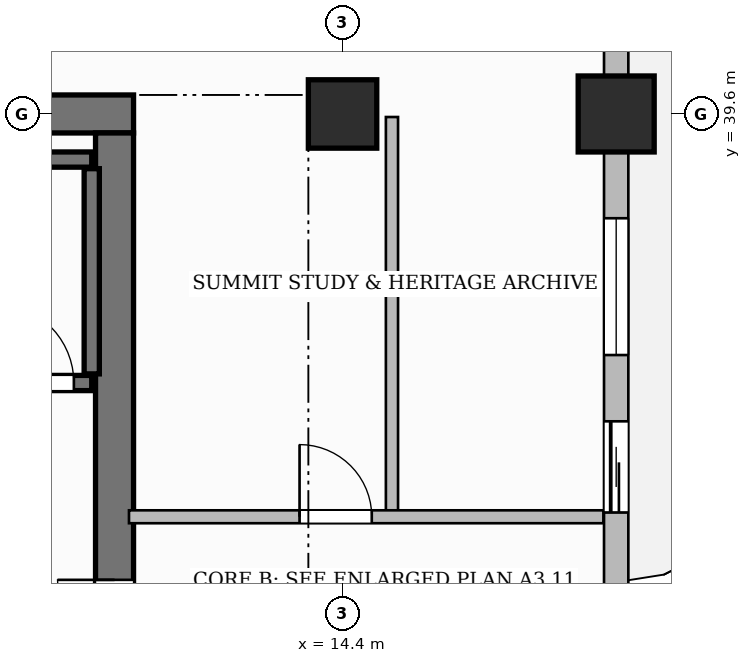
"""IFC4 building model, lengths in metres.
Left out: names, types, materials, properties, quantities, classifications, styles, units other than length and angle.
Written with IfcOpenShell. Run it as: python <this file> out.ifc"""

import sys

from ifc_helpers import new_model, si_unit, direction, frame, frame_2d, origin, origin_2d, place, context, subcontext, project, spatial, rectangle, extrude, source, transform, mapped, element, fill, save


model = new_model("IFC4")
c1 = context("Model", 3, precision=1e-05, world=origin(), true_north=direction((0.0, 1.0)))
c2 = subcontext(c1, "Body", "Model", "MODEL_VIEW")
j1 = project(units=[si_unit("LENGTHUNIT", "METRE"), si_unit("PLANEANGLEUNIT", "RADIAN")], contexts=[c1])
p1 = place(None, origin())
s1 = spatial("IfcSite", under=j1, at=p1, CompositionType="ELEMENT")
p2 = place(p1, origin())
s2 = spatial("IfcBuilding", under=s1, at=p2, CompositionType="ELEMENT")
p3 = place(p2, frame((0.0, 0.0, 209.6)))
s3 = spatial("IfcBuildingStorey", under=s2, at=p3, CompositionType="ELEMENT", Elevation=209.6)
p4 = place(p3, frame((3.35, 39.6, 0.0), z_axis=(0.0, 0.0, 1.0), x_axis=(1.0, 0.0, 0.0)))
e1 = element("IfcWall", 1, at=p4, inside=s3, PredefinedType="SHEAR", context=c2, shape_type="SweptSolid", body=[
    extrude(rectangle(XDim=8.3, YDim=0.5, at=frame_2d((4.15, 0.0))), origin(), (0.0, 0.0, 1.0), 3.85),
])
p5 = place(p3, frame((11.4, 25.45, 0.0), z_axis=(0.0, 0.0, 1.0), x_axis=(0.0, 1.0, 0.0)))
e2 = element("IfcWall", 2, at=p5, inside=s3, PredefinedType="SHEAR", context=c2, shape_type="SweptSolid", body=[
    extrude(rectangle(XDim=13.9, YDim=0.5, at=frame_2d((6.95, 0.0))), origin(), (0.0, 0.0, 1.0), 3.85),
])
p6 = place(p5, frame((6.52, 0.0, 0.0)))
e3 = element("IfcOpeningElement", 3, at=p6, cuts=e2, PredefinedType="OPENING", context=c2, shape_type="SweptSolid", body=[
    extrude(rectangle(XDim=1.5, YDim=2.2, at=frame_2d((0.75, 1.1))), frame((0.0, 0.26, 0.0), z_axis=(0.0, -1.0, 0.0), x_axis=(1.0, 0.0, 0.0)), (0.0, 0.0, 1.0), 0.52),
])
m1 = source(origin(), c2, "Body", "SweptSolid", [
    extrude(rectangle(XDim=0.9, YDim=0.9, at=origin_2d()), origin(), (0.0, 0.0, 1.0), 3.85),
])
p7 = place(p3, frame((14.4, 39.6, 0.0), z_axis=(0.0, 0.0, 1.0), x_axis=(1.0, 0.0, 0.0)))
e4 = element("IfcColumn", 4, at=p7, inside=s3, PredefinedType="COLUMN", context=c2, shape_type="MappedRepresentation", body=[
    mapped(m1, transform((0.0, 0.0, 0.0), scale=1.0)),
])
m2 = source(origin(), c2, "Body", "SweptSolid", [
    extrude(rectangle(XDim=1.0, YDim=1.0, at=origin_2d()), origin(), (0.0, 0.0, 1.0), 3.85),
])
p8 = place(p3, frame((18.0, 39.6, 0.0), z_axis=(0.0, 0.0, 1.0), x_axis=(1.0, 0.0, 0.0)))
e5 = element("IfcColumn", 5, at=p8, inside=s3, PredefinedType="COLUMN", context=c2, shape_type="MappedRepresentation", body=[
    mapped(m2, transform((0.0, 0.0, 0.0), scale=1.0)),
])
p9 = place(p3, frame((4.0, 39.0, 0.0), z_axis=(0.0, 0.0, 1.0), x_axis=(1.0, 0.0, 0.0)))
e6 = element("IfcWall", 6, at=p9, inside=s3, PredefinedType="SHEAR", context=c2, shape_type="SweptSolid", body=[
    extrude(rectangle(XDim=7.1, YDim=0.2, at=frame_2d((3.55, 0.0))), origin(), (0.0, 0.0, 1.0), 3.85),
])
p10 = place(p3, frame((11.1, 36.18, 0.0), z_axis=(0.0, 0.0, 1.0), x_axis=(0.0, 1.0, 0.0)))
e7 = element("IfcWall", 7, at=p10, inside=s3, PredefinedType="SHEAR", context=c2, shape_type="SweptSolid", body=[
    extrude(rectangle(XDim=2.7, YDim=0.2, at=frame_2d((1.35, 0.0))), origin(), (0.0, 0.0, 1.0), 3.85),
])
p11 = place(p3, frame((4.0, 36.06, 0.0), z_axis=(0.0, 0.0, 1.0), x_axis=(1.0, 0.0, 0.0)))
e8 = element("IfcWall", 8, at=p11, inside=s3, PredefinedType="SHEAR", context=c2, shape_type="SweptSolid", body=[
    extrude(rectangle(XDim=7.1, YDim=0.2, at=frame_2d((3.55, 0.0))), origin(), (0.0, 0.0, 1.0), 3.85),
])
p12 = place(p11, frame((5.815, 0.0, 0.0)))
e9 = element("IfcOpeningElement", 9, at=p12, cuts=e8, PredefinedType="OPENING", context=c2, shape_type="SweptSolid", body=[
    extrude(rectangle(XDim=1.05, YDim=2.2, at=frame_2d((0.525, 1.1))), frame((0.0, 0.11, 0.0), z_axis=(0.0, -1.0, 0.0), x_axis=(1.0, 0.0, 0.0)), (0.0, 0.0, 1.0), 0.22),
])
p13 = place(p3, frame((15.05, 34.34, 0.0), z_axis=(0.0, 0.0, 1.0), x_axis=(0.0, 1.0, 0.0)))
e10 = element("IfcWall", 10, at=p13, inside=s3, PredefinedType="PARTITIONING", context=c2, shape_type="SweptSolid", body=[
    extrude(rectangle(XDim=5.22, YDim=0.16, at=frame_2d((2.61, 0.0))), origin(), (0.0, 0.0, 1.0), 3.6),
])
p14 = place(p3, frame((11.59, 34.3, 0.0), z_axis=(0.0, 0.0, 1.0), x_axis=(1.0, 0.0, 0.0)))
e11 = element("IfcWall", 11, at=p14, inside=s3, PredefinedType="PARTITIONING", context=c2, shape_type="SweptSolid", body=[
    extrude(rectangle(XDim=6.242, YDim=0.17, at=frame_2d((3.121, 0.0))), origin(), (0.0, 0.0, 1.0), 3.6),
])
p15 = place(p14, frame((2.244, 0.0, 0.0)))
e12 = element("IfcOpeningElement", 12, at=p15, cuts=e11, PredefinedType="OPENING", context=c2, shape_type="SweptSolid", body=[
    extrude(rectangle(XDim=0.95, YDim=2.15, at=frame_2d((0.475, 1.075))), frame((0.0, 0.095, 0.0), z_axis=(0.0, -1.0, 0.0), x_axis=(1.0, 0.0, 0.0)), (0.0, 0.0, 1.0), 0.19),
])
p16 = place(p3, frame((18.0, 21.65, 0.0), z_axis=(0.0, 0.0, 1.0), x_axis=(0.0, 1.0, 0.0)))
e13 = element("IfcWall", 13, at=p16, inside=s3, PredefinedType="SOLIDWALL", context=c2, shape_type="SweptSolid", body=[
    extrude(rectangle(XDim=25.1, YDim=0.32, at=frame_2d((12.55, 0.0))), origin(), (0.0, 0.0, 1.0), 3.6),
])
p17 = place(p16, frame((12.706, 0.0, 0.0)))
e14 = element("IfcOpeningElement", 14, at=p17, cuts=e13, PredefinedType="OPENING", context=c2, shape_type="SweptSolid", body=[
    extrude(rectangle(XDim=1.2, YDim=2.2, at=frame_2d((0.6, 1.1))), frame((0.0, 0.17, 0.0), z_axis=(0.0, -1.0, 0.0), x_axis=(1.0, 0.0, 0.0)), (0.0, 0.0, 1.0), 0.34),
])
p18 = place(p16, frame((1.89, 0.0, 0.8)))
e15 = element("IfcOpeningElement", 15, at=p18, cuts=e13, PredefinedType="OPENING", context=c2, shape_type="SweptSolid", body=[
    extrude(rectangle(XDim=1.8, YDim=1.85, at=frame_2d((0.9, 0.925))), frame((0.0, 0.17, 0.0), z_axis=(0.0, -1.0, 0.0), x_axis=(1.0, 0.0, 0.0)), (0.0, 0.0, 1.0), 0.34),
])
p19 = place(p16, frame((6.63, 0.0, 0.8)))
e16 = element("IfcOpeningElement", 16, at=p19, cuts=e13, PredefinedType="OPENING", context=c2, shape_type="SweptSolid", body=[
    extrude(rectangle(XDim=1.8, YDim=1.85, at=frame_2d((0.9, 0.925))), frame((0.0, 0.17, 0.0), z_axis=(0.0, -1.0, 0.0), x_axis=(1.0, 0.0, 0.0)), (0.0, 0.0, 1.0), 0.34),
])
p20 = place(p16, frame((14.778, 0.0, 0.8)))
e17 = element("IfcOpeningElement", 17, at=p20, cuts=e13, PredefinedType="OPENING", context=c2, shape_type="SweptSolid", body=[
    extrude(rectangle(XDim=1.8, YDim=1.85, at=frame_2d((0.9, 0.925))), frame((0.0, 0.17, 0.0), z_axis=(0.0, -1.0, 0.0), x_axis=(1.0, 0.0, 0.0)), (0.0, 0.0, 1.0), 0.34),
])
p21 = place(p16, frame((19.275, 0.0, 0.8)))
e18 = element("IfcOpeningElement", 18, at=p21, cuts=e13, PredefinedType="OPENING", context=c2, shape_type="SweptSolid", body=[
    extrude(rectangle(XDim=1.8, YDim=1.85, at=frame_2d((0.9, 0.925))), frame((0.0, 0.17, 0.0), z_axis=(0.0, -1.0, 0.0), x_axis=(1.0, 0.0, 0.0)), (0.0, 0.0, 1.0), 0.34),
])
p22 = place(p16, frame((22.025, 0.0, 0.8)))
e19 = element("IfcOpeningElement", 19, at=p22, cuts=e13, PredefinedType="OPENING", context=c2, shape_type="SweptSolid", body=[
    extrude(rectangle(XDim=1.8, YDim=1.85, at=frame_2d((0.9, 0.925))), frame((0.0, 0.17, 0.0), z_axis=(0.0, -1.0, 0.0), x_axis=(1.0, 0.0, 0.0)), (0.0, 0.0, 1.0), 0.34),
])
m3 = source(origin(), c2, "Body", "SweptSolid", [
    extrude(rectangle(XDim=1.05, YDim=2.2, at=frame_2d((0.525, 1.1))), frame((0.0, 0.025, 0.0), z_axis=(0.0, -1.0, 0.0), x_axis=(1.0, 0.0, 0.0)), (0.0, 0.0, 1.0), 0.05),
])
p23 = place(p12, origin())
e20 = element("IfcDoor", 20, at=p23, inside=s3, OperationType="SINGLE_SWING_LEFT", PredefinedType="DOOR", context=c2, shape_type="MappedRepresentation", body=[
    mapped(m3, transform((0.0, 0.0, 0.0), scale=1.0)),
])
fill(e9, e20)
m4 = source(origin(), c2, "Body", "SweptSolid", [
    extrude(rectangle(XDim=1.5, YDim=2.2, at=frame_2d((0.75, 1.1))), frame((0.0, 0.025, 0.0), z_axis=(0.0, -1.0, 0.0), x_axis=(1.0, 0.0, 0.0)), (0.0, 0.0, 1.0), 0.05),
])
p24 = place(p6, origin())
e21 = element("IfcDoor", 21, at=p24, inside=s3, OperationType="DOUBLE_DOOR_SINGLE_SWING", PredefinedType="DOOR", context=c2, shape_type="MappedRepresentation", body=[
    mapped(m4, transform((0.0, 0.0, 0.0), scale=1.0)),
])
fill(e3, e21)
m5 = source(origin(), c2, "Body", "SweptSolid", [
    extrude(rectangle(XDim=0.95, YDim=2.15, at=frame_2d((0.475, 1.075))), frame((0.0, 0.025, 0.0), z_axis=(0.0, -1.0, 0.0), x_axis=(1.0, 0.0, 0.0)), (0.0, 0.0, 1.0), 0.05),
])
p25 = place(p15, origin())
e22 = element("IfcDoor", 22, at=p25, inside=s3, OperationType="SINGLE_SWING_LEFT", PredefinedType="DOOR", context=c2, shape_type="MappedRepresentation", body=[
    mapped(m5, transform((0.0, 0.0, 0.0), scale=1.0)),
])
fill(e12, e22)
m6 = source(origin(), c2, "Body", "SweptSolid", [
    extrude(rectangle(XDim=1.2, YDim=2.2, at=frame_2d((0.6, 1.1))), frame((0.0, 0.025, 0.0), z_axis=(0.0, -1.0, 0.0), x_axis=(1.0, 0.0, 0.0)), (0.0, 0.0, 1.0), 0.05),
])
p26 = place(p17, origin())
e23 = element("IfcDoor", 23, at=p26, inside=s3, OperationType="SLIDING_TO_LEFT", PredefinedType="DOOR", context=c2, shape_type="MappedRepresentation", body=[
    mapped(m6, transform((0.0, 0.0, 0.0), scale=1.0)),
])
fill(e14, e23)
m7 = source(origin(), c2, "Body", "SweptSolid", [
    extrude(rectangle(XDim=1.8, YDim=1.85, at=frame_2d((0.9, 0.925))), frame((0.0, 0.03, 0.0), z_axis=(0.0, -1.0, 0.0), x_axis=(1.0, 0.0, 0.0)), (0.0, 0.0, 1.0), 0.06),
])
p27 = place(p20, origin())
e24 = element("IfcWindow", 24, at=p27, inside=s3, PartitioningType="DOUBLE_PANEL_VERTICAL", PredefinedType="WINDOW", context=c2, shape_type="MappedRepresentation", body=[
    mapped(m7, transform((0.0, 0.0, 0.0), scale=1.0)),
])
fill(e17, e24)
save(model, sys.argv[1])
